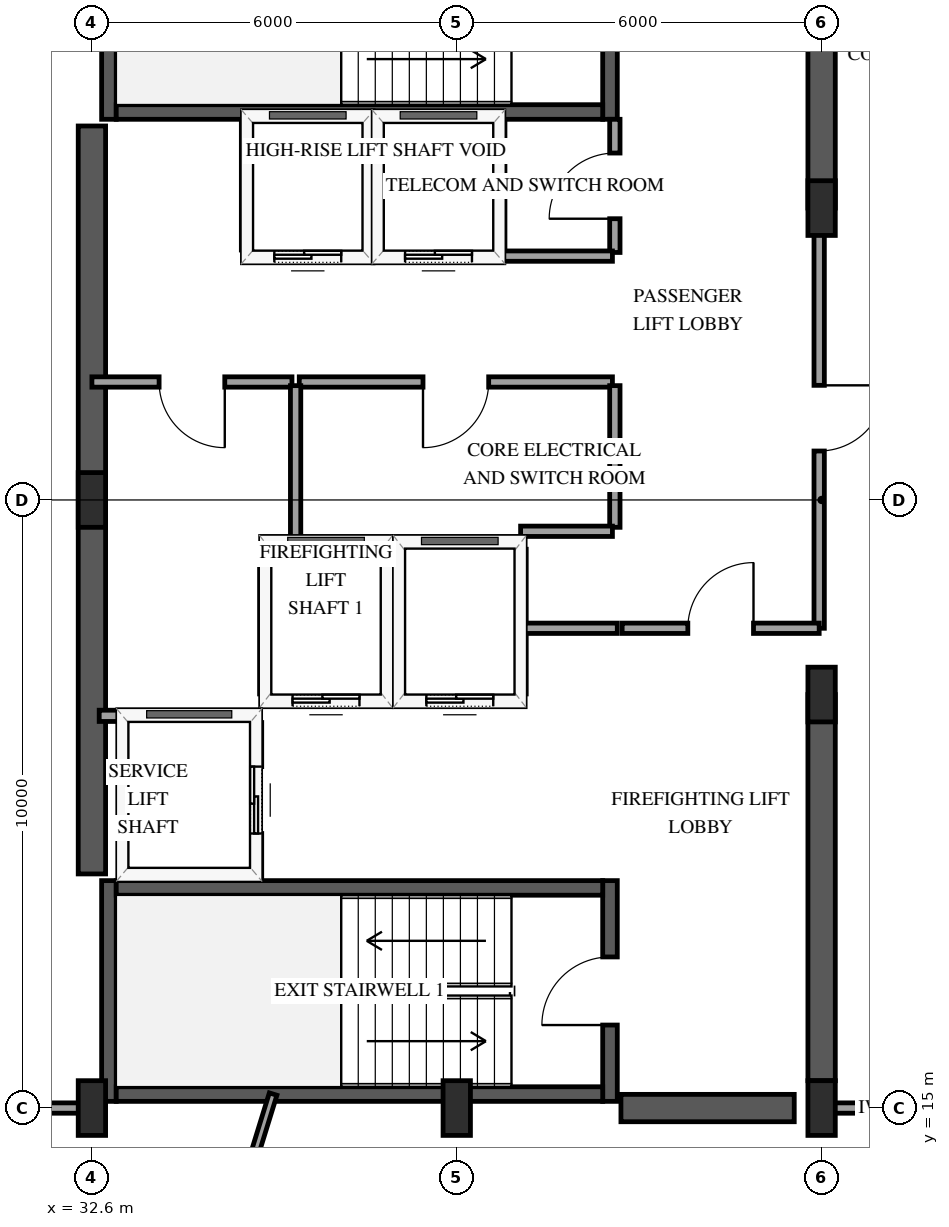
"""IFC4 building model, lengths in metres.
Left out: names, types, materials, properties, quantities, classifications, styles, units other than length and angle.
Written with IfcOpenShell. Run it as: python <this file> out.ifc"""

import sys

from ifc_helpers import new_model, si_unit, direction, frame, frame_2d, origin, origin_2d, place, context, subcontext, project, spatial, rectangle, extrude, element, fill, save


model = new_model("IFC4")
c1 = context("Model", 3, precision=1e-05, world=origin(), true_north=direction((0.0, 1.0)))
c2 = subcontext(c1, "Body", "Model", "MODEL_VIEW")
j1 = project(units=[si_unit("LENGTHUNIT", "METRE"), si_unit("PLANEANGLEUNIT", "RADIAN")], contexts=[c1])
p1 = place(None, origin())
s1 = spatial("IfcSite", under=j1, at=p1, CompositionType="ELEMENT")
p2 = place(p1, origin())
s2 = spatial("IfcBuilding", under=s1, at=p2, CompositionType="ELEMENT")
p3 = place(p2, frame((0.0, 0.0, 250.0)))
s3 = spatial("IfcBuildingStorey", under=s2, at=p3, CompositionType="ELEMENT", Elevation=250.0)
p4 = place(p3, frame((32.88, 15.11, 0.0), z_axis=(0.0, 0.0, 1.0), x_axis=(0.0, 1.0, 0.0)))
e1 = element("IfcWall", 1, at=p4, inside=s3, PredefinedType="SHEAR", context=c2, shape_type="SweptSolid", body=[
    extrude(rectangle(XDim=3.63, YDim=0.24, at=frame_2d((1.815, 0.0))), origin(), (0.0, 0.0, 1.0), 3.75),
])
p5 = place(p3, frame((41.12, 15.11, 0.0), z_axis=(0.0, 0.0, 1.0), x_axis=(0.0, 1.0, 0.0)))
e2 = element("IfcWall", 2, at=p5, inside=s3, PredefinedType="SHEAR", context=c2, shape_type="SweptSolid", body=[
    extrude(rectangle(XDim=3.63, YDim=0.24, at=frame_2d((1.815, 0.0))), origin(), (0.0, 0.0, 1.0), 3.75),
])
p6 = place(p5, frame((1.255, 0.0, 0.0)))
e3 = element("IfcOpeningElement", 3, at=p6, cuts=e2, PredefinedType="OPENING", context=c2, shape_type="SweptSolid", body=[
    extrude(rectangle(XDim=1.12, YDim=2.15, at=frame_2d((0.56, 1.075))), frame((0.0, 0.13, 0.0), z_axis=(0.0, -1.0, 0.0), x_axis=(1.0, 0.0, 0.0)), (0.0, 0.0, 1.0), 0.26),
])
for number, where, z_axis, x_axis in (
    (4, (33.0, 15.23, 0.0), (0.0, 0.0, 1.0), (1.0, 0.0, 0.0)),
    (5, (33.0, 18.62, 0.0), (0.0, 0.0, 1.0), (1.0, 0.0, 0.0)),
):
    element("IfcWall", number, at=place(p3, frame(where, z_axis=z_axis, x_axis=x_axis)), inside=s3, PredefinedType="SHEAR", context=c2, shape_type="SweptSolid", body=[
        extrude(rectangle(XDim=8.0, YDim=0.24, at=frame_2d((4.0, 0.0))), origin(), (0.0, 0.0, 1.0), 3.75),
    ])
p7 = place(p3, frame((32.88, 31.26, 0.0), z_axis=(0.0, 0.0, 1.0), x_axis=(0.0, 1.0, 0.0)))
e6 = element("IfcWall", 6, at=p7, inside=s3, PredefinedType="SHEAR", context=c2, shape_type="SweptSolid", body=[
    extrude(rectangle(XDim=3.63, YDim=0.24, at=frame_2d((1.815, 0.0))), origin(), (0.0, 0.0, 1.0), 3.75),
])
p8 = place(p3, frame((41.12, 31.26, 0.0), z_axis=(0.0, 0.0, 1.0), x_axis=(0.0, 1.0, 0.0)))
e7 = element("IfcWall", 7, at=p8, inside=s3, PredefinedType="SHEAR", context=c2, shape_type="SweptSolid", body=[
    extrude(rectangle(XDim=3.63, YDim=0.24, at=frame_2d((1.815, 0.0))), origin(), (0.0, 0.0, 1.0), 3.75),
])
p9 = place(p8, frame((1.255, 0.0, 0.0)))
e8 = element("IfcOpeningElement", 8, at=p9, cuts=e7, PredefinedType="OPENING", context=c2, shape_type="SweptSolid", body=[
    extrude(rectangle(XDim=1.12, YDim=2.15, at=frame_2d((0.56, 1.075))), frame((0.0, 0.13, 0.0), z_axis=(0.0, -1.0, 0.0), x_axis=(1.0, 0.0, 0.0)), (0.0, 0.0, 1.0), 0.26),
])
p10 = place(p3, frame((33.0, 31.38, 0.0), z_axis=(0.0, 0.0, 1.0), x_axis=(1.0, 0.0, 0.0)))
e9 = element("IfcWall", 9, at=p10, inside=s3, PredefinedType="SHEAR", context=c2, shape_type="SweptSolid", body=[
    extrude(rectangle(XDim=8.0, YDim=0.24, at=frame_2d((4.0, 0.0))), origin(), (0.0, 0.0, 1.0), 3.75),
])
p11 = place(p3, frame((32.6, 18.85, 0.0), z_axis=(0.0, 0.0, 1.0), x_axis=(0.0, 1.0, 0.0)))
e10 = element("IfcWall", 10, at=p11, inside=s3, PredefinedType="SHEAR", context=c2, shape_type="SweptSolid", body=[
    extrude(rectangle(XDim=12.3, YDim=0.45, at=frame_2d((6.15, 0.0))), origin(), (0.0, 0.0, 1.0), 3.75),
])
p12 = place(p3, frame((41.3, 15.0, 0.0), z_axis=(0.0, 0.0, 1.0), x_axis=(1.0, 0.0, 0.0)))
e11 = element("IfcWall", 11, at=p12, inside=s3, PredefinedType="SHEAR", context=c2, shape_type="SweptSolid", body=[
    extrude(rectangle(XDim=2.85, YDim=0.45, at=frame_2d((1.425, 0.0))), origin(), (0.0, 0.0, 1.0), 3.75),
])
p13 = place(p3, frame((44.6, 15.45, 0.0), z_axis=(0.0, 0.0, 1.0), x_axis=(0.0, 1.0, 0.0)))
e12 = element("IfcWall", 12, at=p13, inside=s3, PredefinedType="SHEAR", context=c2, shape_type="SweptSolid", body=[
    extrude(rectangle(XDim=6.35, YDim=0.45, at=frame_2d((3.175, 0.0))), origin(), (0.0, 0.0, 1.0), 3.75),
])
p14 = place(p3, frame((44.6, 29.8, 0.0), z_axis=(0.0, 0.0, 1.0), x_axis=(0.0, 1.0, 0.0)))
e13 = element("IfcWall", 13, at=p14, inside=s3, PredefinedType="SHEAR", context=c2, shape_type="SweptSolid", body=[
    extrude(rectangle(XDim=4.75, YDim=0.45, at=frame_2d((2.375, 0.0))), origin(), (0.0, 0.0, 1.0), 3.75),
])
for number, where, z_axis, x_axis in (
    (14, (32.6, 15.0, 0.0), (0.0, 0.0, 1.0), (1.0, 0.0, 0.0)),
    (15, (32.6, 25.0, 0.0), (0.0, 0.0, 1.0), (1.0, 0.0, 0.0)),
    (16, (38.6, 15.0, 0.0), (0.0, 0.0, 1.0), (1.0, 0.0, 0.0)),
    (17, (44.6, 15.0, 0.0), (0.0, 0.0, 1.0), (1.0, 0.0, 0.0)),
    (18, (44.6, 21.8, 0.0), (0.0, 0.0, 1.0), (1.0, 0.0, 0.0)),
    (19, (44.6, 29.8, 0.0), (0.0, 0.0, 1.0), (1.0, 0.0, 0.0)),
):
    element("IfcColumn", number, at=place(p3, frame(where, z_axis=z_axis, x_axis=x_axis)), inside=s3, PredefinedType="PILASTER", context=c2, shape_type="SweptSolid", body=[
        extrude(rectangle(XDim=0.45, YDim=0.9, at=origin_2d()), origin(), (0.0, 0.0, 1.0), 3.75),
    ])
p15 = place(p3, frame((35.45, 21.7, 0.0), z_axis=(0.0, 0.0, 1.0), x_axis=(1.0, 0.0, 0.0)))
e20 = element("IfcWall", 20, at=p15, inside=s3, PredefinedType="SOLIDWALL", context=c2, shape_type="SweptSolid", body=[
    extrude(rectangle(XDim=2.0, YDim=0.185, at=frame_2d((1.0, 0.0))), origin(), (0.0, 0.0, 1.0), 2.824),
])
p16 = place(p15, frame((0.45, 0.0, 0.0)))
e21 = element("IfcOpeningElement", 21, at=p16, cuts=e20, PredefinedType="OPENING", context=c2, shape_type="SweptSolid", body=[
    extrude(rectangle(XDim=1.1, YDim=2.15, at=frame_2d((0.55, 1.075))), frame((0.0, 0.103, 0.0), z_axis=(0.0, -1.0, 0.0), x_axis=(1.0, 0.0, 0.0)), (0.0, 0.0, 1.0), 0.205),
])
p17 = place(p3, frame((35.45, 24.3, 0.0), z_axis=(0.0, 0.0, 1.0), x_axis=(1.0, 0.0, 0.0)))
e22 = element("IfcWall", 22, at=p17, inside=s3, PredefinedType="SOLIDWALL", context=c2, shape_type="SweptSolid", body=[
    extrude(rectangle(XDim=2.0, YDim=0.185, at=frame_2d((1.0, 0.0))), origin(), (0.0, 0.0, 1.0), 2.824),
])
for number, where, z_axis, x_axis in (
    (23, (35.45, 21.81, 0.0), (0.0, 0.0, 1.0), (0.0, 1.0, 0.0)),
    (24, (37.45, 21.81, 0.0), (0.0, 0.0, 1.0), (0.0, 1.0, 0.0)),
):
    element("IfcWall", number, at=place(p3, frame(where, z_axis=z_axis, x_axis=x_axis)), inside=s3, PredefinedType="SOLIDWALL", context=c2, shape_type="SweptSolid", body=[
        extrude(rectangle(XDim=2.38, YDim=0.185, at=frame_2d((1.19, 0.0))), origin(), (0.0, 0.0, 1.0), 3.45),
    ])
p18 = place(p3, frame((37.65, 21.7, 0.0), z_axis=(0.0, 0.0, 1.0), x_axis=(1.0, 0.0, 0.0)))
e25 = element("IfcWall", 25, at=p18, inside=s3, PredefinedType="SOLIDWALL", context=c2, shape_type="SweptSolid", body=[
    extrude(rectangle(XDim=2.0, YDim=0.185, at=frame_2d((1.0, 0.0))), origin(), (0.0, 0.0, 1.0), 2.824),
])
p19 = place(p18, frame((0.45, 0.0, 0.0)))
e26 = element("IfcOpeningElement", 26, at=p19, cuts=e25, PredefinedType="OPENING", context=c2, shape_type="SweptSolid", body=[
    extrude(rectangle(XDim=1.1, YDim=2.15, at=frame_2d((0.55, 1.075))), frame((0.0, 0.103, 0.0), z_axis=(0.0, -1.0, 0.0), x_axis=(1.0, 0.0, 0.0)), (0.0, 0.0, 1.0), 0.205),
])
p20 = place(p3, frame((37.65, 24.3, 0.0), z_axis=(0.0, 0.0, 1.0), x_axis=(1.0, 0.0, 0.0)))
e27 = element("IfcWall", 27, at=p20, inside=s3, PredefinedType="SOLIDWALL", context=c2, shape_type="SweptSolid", body=[
    extrude(rectangle(XDim=2.0, YDim=0.185, at=frame_2d((1.0, 0.0))), origin(), (0.0, 0.0, 1.0), 2.824),
])
p21 = place(p3, frame((39.65, 21.81, 0.0), z_axis=(0.0, 0.0, 1.0), x_axis=(0.0, 1.0, 0.0)))
e28 = element("IfcWall", 28, at=p21, inside=s3, PredefinedType="SOLIDWALL", context=c2, shape_type="SweptSolid", body=[
    extrude(rectangle(XDim=2.38, YDim=0.185, at=frame_2d((1.19, 0.0))), origin(), (0.0, 0.0, 1.0), 3.45),
])
p22 = place(p3, frame((32.72, 21.45, 0.0), z_axis=(0.0, 0.0, 1.0), x_axis=(1.0, 0.0, 0.0)))
e29 = element("IfcWall", 29, at=p22, inside=s3, PredefinedType="SOLIDWALL", context=c2, shape_type="SweptSolid", body=[
    extrude(rectangle(XDim=2.58, YDim=0.185, at=frame_2d((1.29, 0.0))), origin(), (0.0, 0.0, 1.0), 2.824),
])
p23 = place(p3, frame((35.3, 18.79, 0.0), z_axis=(0.0, 0.0, 1.0), x_axis=(0.0, 1.0, 0.0)))
e30 = element("IfcWall", 30, at=p23, inside=s3, PredefinedType="SOLIDWALL", context=c2, shape_type="SweptSolid", body=[
    extrude(rectangle(XDim=2.55, YDim=0.185, at=frame_2d((1.275, 0.0))), origin(), (0.0, 0.0, 1.0), 3.45),
])
p24 = place(p23, frame((0.725, 0.0, 0.0)))
e31 = element("IfcOpeningElement", 31, at=p24, cuts=e30, PredefinedType="OPENING", context=c2, shape_type="SweptSolid", body=[
    extrude(rectangle(XDim=1.1, YDim=2.15, at=frame_2d((0.55, 1.075))), frame((0.0, 0.103, 0.0), z_axis=(0.0, -1.0, 0.0), x_axis=(1.0, 0.0, 0.0)), (0.0, 0.0, 1.0), 0.205),
])
p25 = place(p3, frame((35.15, 29.0, 0.0), z_axis=(0.0, 0.0, 1.0), x_axis=(1.0, 0.0, 0.0)))
e32 = element("IfcWall", 32, at=p25, inside=s3, PredefinedType="SOLIDWALL", context=c2, shape_type="SweptSolid", body=[
    extrude(rectangle(XDim=2.0, YDim=0.185, at=frame_2d((1.0, 0.0))), origin(), (0.0, 0.0, 1.0), 3.45),
])
p26 = place(p25, frame((0.45, 0.0, 0.0)))
e33 = element("IfcOpeningElement", 33, at=p26, cuts=e32, PredefinedType="OPENING", context=c2, shape_type="SweptSolid", body=[
    extrude(rectangle(XDim=1.1, YDim=2.15, at=frame_2d((0.55, 1.075))), frame((0.0, 0.103, 0.0), z_axis=(0.0, -1.0, 0.0), x_axis=(1.0, 0.0, 0.0)), (0.0, 0.0, 1.0), 0.205),
])
for number, where, z_axis, x_axis in (
    (34, (35.15, 29.11, 0.0), (0.0, 0.0, 1.0), (0.0, 1.0, 0.0)),
    (35, (37.15, 29.11, 0.0), (0.0, 0.0, 1.0), (0.0, 1.0, 0.0)),
):
    element("IfcWall", number, at=place(p3, frame(where, z_axis=z_axis, x_axis=x_axis)), inside=s3, PredefinedType="SOLIDWALL", context=c2, shape_type="SweptSolid", body=[
        extrude(rectangle(XDim=2.1, YDim=0.185, at=frame_2d((1.05, 0.0))), origin(), (0.0, 0.0, 1.0), 3.45),
    ])
p27 = place(p3, frame((37.3, 29.0, 0.0), z_axis=(0.0, 0.0, 1.0), x_axis=(1.0, 0.0, 0.0)))
e36 = element("IfcWall", 36, at=p27, inside=s3, PredefinedType="SOLIDWALL", context=c2, shape_type="SweptSolid", body=[
    extrude(rectangle(XDim=2.0, YDim=0.185, at=frame_2d((1.0, 0.0))), origin(), (0.0, 0.0, 1.0), 3.45),
])
p28 = place(p27, frame((0.45, 0.0, 0.0)))
e37 = element("IfcOpeningElement", 37, at=p28, cuts=e36, PredefinedType="OPENING", context=c2, shape_type="SweptSolid", body=[
    extrude(rectangle(XDim=1.1, YDim=2.15, at=frame_2d((0.55, 1.075))), frame((0.0, 0.103, 0.0), z_axis=(0.0, -1.0, 0.0), x_axis=(1.0, 0.0, 0.0)), (0.0, 0.0, 1.0), 0.205),
])
p29 = place(p3, frame((39.3, 29.11, 0.0), z_axis=(0.0, 0.0, 1.0), x_axis=(0.0, 1.0, 0.0)))
e38 = element("IfcWall", 38, at=p29, inside=s3, PredefinedType="SOLIDWALL", context=c2, shape_type="SweptSolid", body=[
    extrude(rectangle(XDim=2.1, YDim=0.185, at=frame_2d((1.05, 0.0))), origin(), (0.0, 0.0, 1.0), 3.45),
])
p30 = place(p3, frame((44.56, 29.8, 0.0), z_axis=(0.0, 0.0, 1.0), x_axis=(0.0, -1.0, 0.0)))
e39 = element("IfcWall", 39, at=p30, inside=s3, PredefinedType="PARTITIONING", context=c2, shape_type="SweptSolid", body=[
    extrude(rectangle(XDim=6.91, YDim=0.17, at=frame_2d((3.455, 0.0))), origin(), (0.0, 0.0, 1.0), 2.49),
])
p31 = place(p30, frame((2.915, 0.0, 0.0)))
e40 = element("IfcOpeningElement", 40, at=p31, cuts=e39, PredefinedType="OPENING", context=c2, shape_type="SweptSolid", body=[
    extrude(rectangle(XDim=1.08, YDim=2.15, at=frame_2d((0.54, 1.075))), frame((0.0, 0.095, 0.0), z_axis=(0.0, -1.0, 0.0), x_axis=(1.0, 0.0, 0.0)), (0.0, 0.0, 1.0), 0.19),
])
p32 = place(p3, frame((41.16, 26.94, 0.0), z_axis=(0.0, 0.0, 1.0), x_axis=(-1.0, 0.0, 0.0)))
e41 = element("IfcWall", 41, at=p32, inside=s3, PredefinedType="PARTITIONING", context=c2, shape_type="SweptSolid", body=[
    extrude(rectangle(XDim=5.15, YDim=0.17, at=frame_2d((2.575, 0.0))), origin(), (0.0, 0.0, 1.0), 3.45),
])
p33 = place(p32, frame((2.035, 0.0, 0.0)))
e42 = element("IfcOpeningElement", 42, at=p33, cuts=e41, PredefinedType="OPENING", context=c2, shape_type="SweptSolid", body=[
    extrude(rectangle(XDim=1.08, YDim=2.15, at=frame_2d((0.54, 1.075))), frame((0.0, 0.095, 0.0), z_axis=(0.0, -1.0, 0.0), x_axis=(1.0, 0.0, 0.0)), (0.0, 0.0, 1.0), 0.19),
])
p34 = place(p3, frame((35.58, 15.23, 0.0), z_axis=(0.0, 0.0, 1.0), x_axis=(-0.295281740196, -0.95541022284, 0.0)))
e43 = element("IfcWall", 43, at=p34, inside=s3, PredefinedType="PARTITIONING", context=c2, shape_type="SweptSolid", body=[
    extrude(rectangle(XDim=5.12, YDim=0.13, at=frame_2d((2.56, 0.0))), origin(), (0.0, 0.0, 1.0), 2.745),
])
p35 = place(p3, frame((35.89, 26.94, 0.0), z_axis=(0.0, 0.0, 1.0), x_axis=(-1.0, 0.0, 0.0)))
e44 = element("IfcWall", 44, at=p35, inside=s3, PredefinedType="PARTITIONING", context=c2, shape_type="SweptSolid", body=[
    extrude(rectangle(XDim=3.29, YDim=0.17, at=frame_2d((1.645, 0.0))), origin(), (0.0, 0.0, 1.0), 3.45),
])
p36 = place(p35, frame((1.105, 0.0, 0.0)))
e45 = element("IfcOpeningElement", 45, at=p36, cuts=e44, PredefinedType="OPENING", context=c2, shape_type="SweptSolid", body=[
    extrude(rectangle(XDim=1.08, YDim=2.15, at=frame_2d((0.54, 1.075))), frame((0.0, 0.095, 0.0), z_axis=(0.0, -1.0, 0.0), x_axis=(1.0, 0.0, 0.0)), (0.0, 0.0, 1.0), 0.19),
])
p37 = place(p3, frame((41.32, 22.89, 0.0), z_axis=(0.0, 0.0, 1.0), x_axis=(1.0, 0.0, 0.0)))
e46 = element("IfcWall", 46, at=p37, inside=s3, PredefinedType="PARTITIONING", context=c2, shape_type="SweptSolid", body=[
    extrude(rectangle(XDim=3.24, YDim=0.17, at=frame_2d((1.62, 0.0))), origin(), (0.0, 0.0, 1.0), 3.45),
])
p38 = place(p37, frame((1.08, 0.0, 0.0)))
e47 = element("IfcOpeningElement", 47, at=p38, cuts=e46, PredefinedType="OPENING", context=c2, shape_type="SweptSolid", body=[
    extrude(rectangle(XDim=1.08, YDim=2.15, at=frame_2d((0.54, 1.075))), frame((0.0, 0.095, 0.0), z_axis=(0.0, -1.0, 0.0), x_axis=(1.0, 0.0, 0.0)), (0.0, 0.0, 1.0), 0.19),
])
p39 = place(p3, frame((35.95, 26.88, 0.0), z_axis=(0.0, 0.0, 1.0), x_axis=(0.0, -1.0, 0.0)))
e48 = element("IfcWall", 48, at=p39, inside=s3, PredefinedType="PARTITIONING", context=c2, shape_type="SweptSolid", body=[
    extrude(rectangle(XDim=2.58, YDim=0.17, at=frame_2d((1.29, 0.0))), origin(), (0.0, 0.0, 1.0), 3.45),
])
p40 = place(p3, frame((32.53, 15.0, 0.0), z_axis=(0.0, 0.0, 1.0), x_axis=(-1.0, 0.0, 0.0)))
e49 = element("IfcWall", 49, at=p40, inside=s3, PredefinedType="PARTITIONING", context=c2, shape_type="SweptSolid", body=[
    extrude(rectangle(XDim=2.537, YDim=0.17, at=frame_2d((1.269, 0.0))), origin(), (0.0, 0.0, 1.0), 3.45),
])
p41 = place(p3, frame((41.2, 24.55, 0.0), z_axis=(0.0, 0.0, 1.0), x_axis=(0.0, 1.0, 0.0)))
e50 = element("IfcWall", 50, at=p41, inside=s3, PredefinedType="PARTITIONING", context=c2, shape_type="SweptSolid", body=[
    extrude(rectangle(XDim=2.33, YDim=0.17, at=frame_2d((1.165, 0.0))), origin(), (0.0, 0.0, 1.0), 3.45),
])
p42 = place(p3, frame((41.2, 29.07, 0.0), z_axis=(0.0, 0.0, 1.0), x_axis=(0.0, 1.0, 0.0)))
e51 = element("IfcWall", 51, at=p42, inside=s3, PredefinedType="PARTITIONING", context=c2, shape_type="SweptSolid", body=[
    extrude(rectangle(XDim=2.19, YDim=0.17, at=frame_2d((1.095, 0.0))), origin(), (0.0, 0.0, 1.0), 3.45),
])
p43 = place(p42, frame((0.555, 0.0, 0.0)))
e52 = element("IfcOpeningElement", 52, at=p43, cuts=e51, PredefinedType="OPENING", context=c2, shape_type="SweptSolid", body=[
    extrude(rectangle(XDim=1.08, YDim=2.15, at=frame_2d((0.54, 1.075))), frame((0.0, 0.095, 0.0), z_axis=(0.0, -1.0, 0.0), x_axis=(1.0, 0.0, 0.0)), (0.0, 0.0, 1.0), 0.19),
])
p44 = place(p3, frame((39.3, 29.01, 0.0), z_axis=(0.0, 0.0, 1.0), x_axis=(1.0, 0.0, 0.0)))
e53 = element("IfcWall", 53, at=p44, inside=s3, PredefinedType="PARTITIONING", context=c2, shape_type="SweptSolid", body=[
    extrude(rectangle(XDim=1.86, YDim=0.17, at=frame_2d((0.93, 0.0))), origin(), (0.0, 0.0, 1.0), 3.45),
])
p45 = place(p3, frame((39.72, 22.89, 0.0), z_axis=(0.0, 0.0, 1.0), x_axis=(1.0, 0.0, 0.0)))
e54 = element("IfcWall", 54, at=p45, inside=s3, PredefinedType="PARTITIONING", context=c2, shape_type="SweptSolid", body=[
    extrude(rectangle(XDim=1.52, YDim=0.17, at=frame_2d((0.76, 0.0))), origin(), (0.0, 0.0, 1.0), 3.45),
])
p46 = place(p3, frame((39.65, 24.485, 0.0), z_axis=(0.0, 0.0, 1.0), x_axis=(1.0, 0.0, 0.0)))
e55 = element("IfcWall", 55, at=p46, inside=s3, PredefinedType="PARTITIONING", context=c2, shape_type="SweptSolid", body=[
    extrude(rectangle(XDim=1.51, YDim=0.17, at=frame_2d((0.755, 0.0))), origin(), (0.0, 0.0, 1.0), 2.824),
])
p47 = place(p3, frame((45.439, 15.0, 0.0), z_axis=(0.0, 0.0, 1.0), x_axis=(-1.0, 0.0, 0.0)))
e56 = element("IfcWall", 56, at=p47, inside=s3, PredefinedType="PARTITIONING", context=c2, shape_type="SweptSolid", body=[
    extrude(rectangle(XDim=0.769, YDim=0.17, at=frame_2d((0.385, 0.0))), origin(), (0.0, 0.0, 1.0), 3.45),
])
p48 = place(p16, origin())
e57 = element("IfcDoor", 57, at=p48, inside=s3, OperationType="SLIDING_TO_LEFT", PredefinedType="DOOR", context=c2, shape_type="SweptSolid", body=[
    extrude(rectangle(XDim=1.1, YDim=2.15, at=frame_2d((0.55, 1.075))), frame((0.0, 0.025, 0.0), z_axis=(0.0, -1.0, 0.0), x_axis=(1.0, 0.0, 0.0)), (0.0, 0.0, 1.0), 0.05),
])
fill(e21, e57)
p49 = place(p19, origin())
e58 = element("IfcDoor", 58, at=p49, inside=s3, OperationType="SLIDING_TO_LEFT", PredefinedType="DOOR", context=c2, shape_type="SweptSolid", body=[
    extrude(rectangle(XDim=1.1, YDim=2.15, at=frame_2d((0.55, 1.075))), frame((0.0, 0.025, 0.0), z_axis=(0.0, -1.0, 0.0), x_axis=(1.0, 0.0, 0.0)), (0.0, 0.0, 1.0), 0.05),
])
fill(e26, e58)
p50 = place(p24, origin())
e59 = element("IfcDoor", 59, at=p50, inside=s3, OperationType="SLIDING_TO_LEFT", PredefinedType="DOOR", context=c2, shape_type="SweptSolid", body=[
    extrude(rectangle(XDim=1.1, YDim=2.15, at=frame_2d((0.55, 1.075))), frame((0.0, 0.025, 0.0), z_axis=(0.0, -1.0, 0.0), x_axis=(1.0, 0.0, 0.0)), (0.0, 0.0, 1.0), 0.05),
])
fill(e31, e59)
p51 = place(p26, origin())
e60 = element("IfcDoor", 60, at=p51, inside=s3, OperationType="SLIDING_TO_LEFT", PredefinedType="DOOR", context=c2, shape_type="SweptSolid", body=[
    extrude(rectangle(XDim=1.1, YDim=2.15, at=frame_2d((0.55, 1.075))), frame((0.0, 0.025, 0.0), z_axis=(0.0, -1.0, 0.0), x_axis=(1.0, 0.0, 0.0)), (0.0, 0.0, 1.0), 0.05),
])
fill(e33, e60)
p52 = place(p28, origin())
e61 = element("IfcDoor", 61, at=p52, inside=s3, OperationType="SLIDING_TO_LEFT", PredefinedType="DOOR", context=c2, shape_type="SweptSolid", body=[
    extrude(rectangle(XDim=1.1, YDim=2.15, at=frame_2d((0.55, 1.075))), frame((0.0, 0.025, 0.0), z_axis=(0.0, -1.0, 0.0), x_axis=(1.0, 0.0, 0.0)), (0.0, 0.0, 1.0), 0.05),
])
fill(e37, e61)
p53 = place(p6, origin())
e62 = element("IfcDoor", 62, at=p53, inside=s3, OperationType="SINGLE_SWING_LEFT", PredefinedType="DOOR", context=c2, shape_type="SweptSolid", body=[
    extrude(rectangle(XDim=1.12, YDim=2.15, at=frame_2d((0.56, 1.075))), frame((0.0, 0.025, 0.0), z_axis=(0.0, -1.0, 0.0), x_axis=(1.0, 0.0, 0.0)), (0.0, 0.0, 1.0), 0.05),
])
fill(e3, e62)
p54 = place(p31, origin())
e63 = element("IfcDoor", 63, at=p54, inside=s3, OperationType="SINGLE_SWING_LEFT", PredefinedType="DOOR", context=c2, shape_type="SweptSolid", body=[
    extrude(rectangle(XDim=1.08, YDim=2.15, at=frame_2d((0.54, 1.075))), frame((0.0, 0.025, 0.0), z_axis=(0.0, -1.0, 0.0), x_axis=(1.0, 0.0, 0.0)), (0.0, 0.0, 1.0), 0.05),
])
fill(e40, e63)
p55 = place(p33, origin())
e64 = element("IfcDoor", 64, at=p55, inside=s3, OperationType="SINGLE_SWING_RIGHT", PredefinedType="DOOR", context=c2, shape_type="SweptSolid", body=[
    extrude(rectangle(XDim=1.08, YDim=2.15, at=frame_2d((0.54, 1.075))), frame((0.0, 0.025, 0.0), z_axis=(0.0, -1.0, 0.0), x_axis=(1.0, 0.0, 0.0)), (0.0, 0.0, 1.0), 0.05),
])
fill(e42, e64)
p56 = place(p36, origin())
e65 = element("IfcDoor", 65, at=p56, inside=s3, OperationType="SINGLE_SWING_LEFT", PredefinedType="DOOR", context=c2, shape_type="SweptSolid", body=[
    extrude(rectangle(XDim=1.08, YDim=2.15, at=frame_2d((0.54, 1.075))), frame((0.0, 0.025, 0.0), z_axis=(0.0, -1.0, 0.0), x_axis=(1.0, 0.0, 0.0)), (0.0, 0.0, 1.0), 0.05),
])
fill(e45, e65)
p57 = place(p38, origin())
e66 = element("IfcDoor", 66, at=p57, inside=s3, OperationType="SINGLE_SWING_RIGHT", PredefinedType="DOOR", context=c2, shape_type="SweptSolid", body=[
    extrude(rectangle(XDim=1.08, YDim=2.15, at=frame_2d((0.54, 1.075))), frame((0.0, 0.025, 0.0), z_axis=(0.0, -1.0, 0.0), x_axis=(1.0, 0.0, 0.0)), (0.0, 0.0, 1.0), 0.05),
])
fill(e47, e66)
p58 = place(p43, origin())
e67 = element("IfcDoor", 67, at=p58, inside=s3, OperationType="SINGLE_SWING_LEFT", PredefinedType="DOOR", context=c2, shape_type="SweptSolid", body=[
    extrude(rectangle(XDim=1.08, YDim=2.15, at=frame_2d((0.54, 1.075))), frame((0.0, 0.025, 0.0), z_axis=(0.0, -1.0, 0.0), x_axis=(1.0, 0.0, 0.0)), (0.0, 0.0, 1.0), 0.05),
])
fill(e52, e67)
save(model, sys.argv[1])
